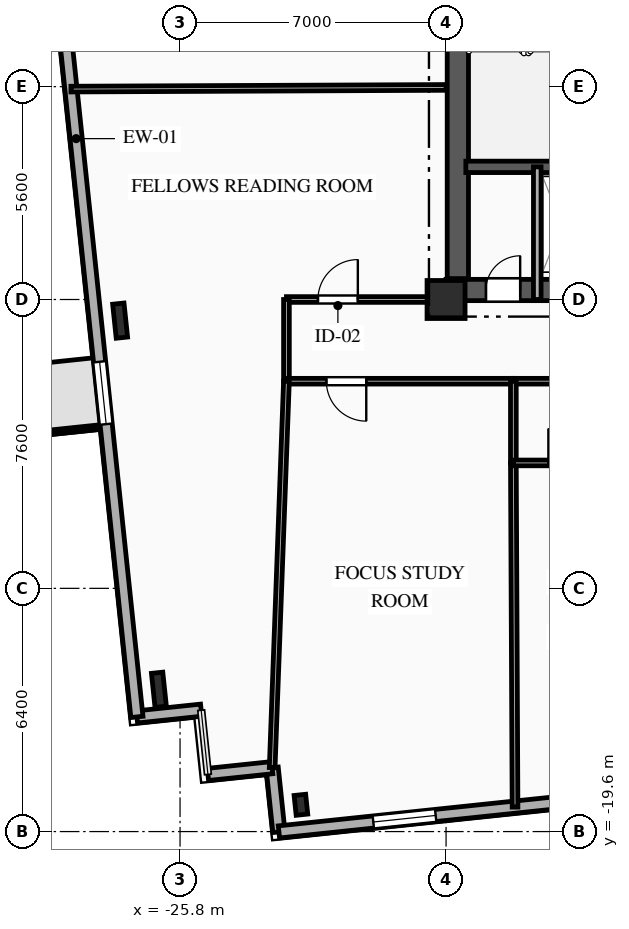
"""IFC4 building model, lengths in metres.
Left out: names, types, materials, properties, quantities, classifications, styles, units other than length and angle.
Written with IfcOpenShell. Run it as: python <this file> out.ifc"""

import sys

from ifc_helpers import new_model, si_unit, direction, frame, frame_2d, origin, origin_2d, place, context, subcontext, project, spatial, rectangle, i_section, extrude, element, fill, save


model = new_model("IFC4")
c1 = context("Model", 3, precision=1e-05, world=origin(), true_north=direction((0.0, 1.0)))
c2 = subcontext(c1, "Body", "Model", "MODEL_VIEW")
j1 = project(units=[si_unit("LENGTHUNIT", "METRE"), si_unit("PLANEANGLEUNIT", "RADIAN")], contexts=[c1])
p1 = place(None, origin())
s1 = spatial("IfcSite", under=j1, at=p1, CompositionType="ELEMENT")
p2 = place(p1, origin())
s2 = spatial("IfcBuilding", under=s1, at=p2, CompositionType="ELEMENT")
p3 = place(p2, frame((0.0, 0.0, 119.2)))
s3 = spatial("IfcBuildingStorey", under=s2, at=p3, CompositionType="ELEMENT", Elevation=119.2)
p4 = place(p3, frame((-18.8, -5.6, 0.0), z_axis=(0.0, 0.0, 1.0), x_axis=(1.0, 0.0, 0.0)))
e1 = element("IfcColumn", 1, at=p4, inside=s3, PredefinedType="COLUMN", context=c2, shape_type="SweptSolid", body=[
    extrude(rectangle(XDim=1.0, YDim=1.0, at=origin_2d()), origin(), (0.0, 0.0, 1.0), 3.35),
])
p5 = place(p3, frame((-22.619, -18.895, 0.0), z_axis=(0.0, 0.0, 1.0), x_axis=(0.994521895368, 0.104528463268, 0.0)))
e2 = element("IfcColumn", 2, at=p5, inside=s3, PredefinedType="COLUMN", context=c2, shape_type="SweptSolid", body=[
    extrude(i_section(OverallWidth=0.306, OverallDepth=0.524, WebThickness=0.021, FlangeThickness=0.04, FilletRadius=0.027, at=origin_2d()), origin(), (0.0, 0.0, 1.0), 3.35),
])
for number, where, z_axis, x_axis in (
    (3, (-27.377, -6.156, 0.0), (0.0, 0.0, 1.0), (0.995, 0.105, 0.0)),
    (4, (-26.356, -15.869, 0.0), (0.0, 0.0, 1.0), (0.995, 0.105, 0.0)),
):
    element("IfcColumn", number, at=place(p3, frame(where, z_axis=z_axis, x_axis=x_axis)), inside=s3, PredefinedType="COLUMN", context=c2, shape_type="SweptSolid", body=[
        extrude(i_section(OverallWidth=0.3, OverallDepth=0.9, WebThickness=0.019, FlangeThickness=0.035, FilletRadius=0.03, at=origin_2d()), origin(), (0.0, 0.0, 1.0), 3.35),
    ])
for number, where, z_axis, x_axis in (
    (5, (-23.198, -19.609, 0.0), (0.0, 0.0, 1.0), (-0.105, 0.995, 0.0)),
    (6, (-23.376, -17.919, 0.0), (0.0, 0.0, 1.0), (-0.995, -0.105, 0.0)),
):
    element("IfcWall", number, at=place(p3, frame(where, z_axis=z_axis, x_axis=x_axis)), inside=s3, PredefinedType="SOLIDWALL", context=c2, shape_type="SweptSolid", body=[
        extrude(rectangle(XDim=1.7, YDim=0.32, at=frame_2d((0.85, 0.0))), origin(), (0.0, 0.0, 1.0), 3.045),
    ])
p6 = place(p3, frame((-25.244, -16.406, 0.0), z_axis=(0.0, 0.0, 1.0), x_axis=(-0.994521177842, -0.104535289845, 0.0)))
e7 = element("IfcWall", 7, at=p6, inside=s3, PredefinedType="SOLIDWALL", context=c2, shape_type="SweptSolid", body=[
    extrude(rectangle(XDim=1.7, YDim=0.32, at=frame_2d((0.85, 0.0))), origin(), (0.0, 0.0, 1.0), 3.045),
])
p7 = place(p3, frame((-26.935, -16.583, 0.0), z_axis=(0.0, 0.0, 1.0), x_axis=(-0.104524887486, 0.994522271192, 0.0)))
e8 = element("IfcWall", 8, at=p7, inside=s3, PredefinedType="SOLIDWALL", context=c2, shape_type="SweptSolid", body=[
    extrude(rectangle(XDim=30.6, YDim=0.32, at=frame_2d((15.3, 0.0))), origin(), (0.0, 0.0, 1.0), 3.045),
])
p8 = place(p7, frame((7.746, 0.0, 0.85)))
e9 = element("IfcOpeningElement", 9, at=p8, cuts=e8, PredefinedType="OPENING", context=c2, shape_type="SweptSolid", body=[
    extrude(rectangle(XDim=1.65, YDim=1.85, at=frame_2d((0.825, 0.925))), frame((0.0, 0.17, 0.0), z_axis=(0.0, -1.0, 0.0), x_axis=(1.0, 0.0, 0.0)), (0.0, 0.0, 1.0), 0.34),
])
p9 = place(p7, frame((22.606, 0.0, 0.85)))
e10 = element("IfcOpeningElement", 10, at=p9, cuts=e8, PredefinedType="OPENING", context=c2, shape_type="SweptSolid", body=[
    extrude(rectangle(XDim=1.65, YDim=1.85, at=frame_2d((0.825, 0.925))), frame((0.0, 0.17, 0.0), z_axis=(0.0, -1.0, 0.0), x_axis=(1.0, 0.0, 0.0)), (0.0, 0.0, 1.0), 0.34),
])
p10 = place(p3, frame((30.307, -13.986, 0.0), z_axis=(0.0, 0.0, 1.0), x_axis=(-0.994521628355, -0.104531003701, 0.0)))
e11 = element("IfcWall", 11, at=p10, inside=s3, PredefinedType="SOLIDWALL", context=c2, shape_type="SweptSolid", body=[
    extrude(rectangle(XDim=53.8, YDim=0.32, at=frame_2d((26.9, 0.0))), origin(), (0.0, 0.0, 1.0), 3.045),
])
p11 = place(p10, frame((3.098, 0.0, 0.85)))
e12 = element("IfcOpeningElement", 12, at=p11, cuts=e11, PredefinedType="OPENING", context=c2, shape_type="SweptSolid", body=[
    extrude(rectangle(XDim=1.65, YDim=1.85, at=frame_2d((0.825, 0.925))), frame((0.0, 0.17, 0.0), z_axis=(0.0, -1.0, 0.0), x_axis=(1.0, 0.0, 0.0)), (0.0, 0.0, 1.0), 0.34),
])
p12 = place(p10, frame((10.143, 0.0, 0.85)))
e13 = element("IfcOpeningElement", 13, at=p12, cuts=e11, PredefinedType="OPENING", context=c2, shape_type="SweptSolid", body=[
    extrude(rectangle(XDim=1.65, YDim=1.85, at=frame_2d((0.825, 0.925))), frame((0.0, 0.17, 0.0), z_axis=(0.0, -1.0, 0.0), x_axis=(1.0, 0.0, 0.0)), (0.0, 0.0, 1.0), 0.34),
])
p13 = place(p10, frame((16.753, 0.0, 0.85)))
e14 = element("IfcOpeningElement", 14, at=p13, cuts=e11, PredefinedType="OPENING", context=c2, shape_type="SweptSolid", body=[
    extrude(rectangle(XDim=2.2, YDim=1.85, at=frame_2d((1.1, 0.925))), frame((0.0, 0.17, 0.0), z_axis=(0.0, -1.0, 0.0), x_axis=(1.0, 0.0, 0.0)), (0.0, 0.0, 1.0), 0.34),
])
p14 = place(p10, frame((23.358, 0.0, 0.85)))
e15 = element("IfcOpeningElement", 15, at=p14, cuts=e11, PredefinedType="OPENING", context=c2, shape_type="SweptSolid", body=[
    extrude(rectangle(XDim=2.2, YDim=1.85, at=frame_2d((1.1, 0.925))), frame((0.0, 0.17, 0.0), z_axis=(0.0, -1.0, 0.0), x_axis=(1.0, 0.0, 0.0)), (0.0, 0.0, 1.0), 0.34),
])
p15 = place(p10, frame((29.963, 0.0, 0.85)))
e16 = element("IfcOpeningElement", 16, at=p15, cuts=e11, PredefinedType="OPENING", context=c2, shape_type="SweptSolid", body=[
    extrude(rectangle(XDim=2.2, YDim=1.85, at=frame_2d((1.1, 0.925))), frame((0.0, 0.17, 0.0), z_axis=(0.0, -1.0, 0.0), x_axis=(1.0, 0.0, 0.0)), (0.0, 0.0, 1.0), 0.34),
])
p16 = place(p10, frame((36.568, 0.0, 0.85)))
e17 = element("IfcOpeningElement", 17, at=p16, cuts=e11, PredefinedType="OPENING", context=c2, shape_type="SweptSolid", body=[
    extrude(rectangle(XDim=2.2, YDim=1.85, at=frame_2d((1.1, 0.925))), frame((0.0, 0.17, 0.0), z_axis=(0.0, -1.0, 0.0), x_axis=(1.0, 0.0, 0.0)), (0.0, 0.0, 1.0), 0.34),
])
p17 = place(p10, frame((43.173, 0.0, 0.85)))
e18 = element("IfcOpeningElement", 18, at=p17, cuts=e11, PredefinedType="OPENING", context=c2, shape_type="SweptSolid", body=[
    extrude(rectangle(XDim=2.2, YDim=1.85, at=frame_2d((1.1, 0.925))), frame((0.0, 0.17, 0.0), z_axis=(0.0, -1.0, 0.0), x_axis=(1.0, 0.0, 0.0)), (0.0, 0.0, 1.0), 0.34),
])
p18 = place(p10, frame((49.653, 0.0, 0.85)))
e19 = element("IfcOpeningElement", 19, at=p18, cuts=e11, PredefinedType="OPENING", context=c2, shape_type="SweptSolid", body=[
    extrude(rectangle(XDim=1.65, YDim=1.85, at=frame_2d((0.825, 0.925))), frame((0.0, 0.17, 0.0), z_axis=(0.0, -1.0, 0.0), x_axis=(1.0, 0.0, 0.0)), (0.0, 0.0, 1.0), 0.34),
])
p19 = place(p3, frame((-18.8, -5.35, 0.0), z_axis=(0.0, 0.0, 1.0), x_axis=(1.0, 0.0, 0.0)))
e20 = element("IfcWall", 20, at=p19, inside=s3, PredefinedType="SHEAR", context=c2, shape_type="SweptSolid", body=[
    extrude(rectangle(XDim=9.6, YDim=0.56, at=frame_2d((4.8, 0.0))), origin(), (0.0, 0.0, 1.0), 3.045),
])
p20 = place(p19, frame((1.05, 0.0, 0.0)))
e21 = element("IfcOpeningElement", 21, at=p20, cuts=e20, PredefinedType="OPENING", context=c2, shape_type="SweptSolid", body=[
    extrude(rectangle(XDim=0.9, YDim=2.1, at=frame_2d((0.45, 1.05))), frame((0.0, 0.29, 0.0), z_axis=(0.0, -1.0, 0.0), x_axis=(1.0, 0.0, 0.0)), (0.0, 0.0, 1.0), 0.58),
])
p21 = place(p3, frame((-18.49, -5.05, 0.0), z_axis=(0.0, 0.0, 1.0), x_axis=(0.0, 1.0, 0.0)))
e22 = element("IfcWall", 22, at=p21, inside=s3, PredefinedType="SHEAR", context=c2, shape_type="SweptSolid", body=[
    extrude(rectangle(XDim=10.1, YDim=0.56, at=frame_2d((5.05, 0.0))), origin(), (0.0, 0.0, 1.0), 3.045),
])
p22 = place(p3, frame((-18.28, -2.11, 0.0), z_axis=(0.0, 0.0, 1.0), x_axis=(1.0, 0.0, 0.0)))
e23 = element("IfcWall", 23, at=p22, inside=s3, PredefinedType="SHEAR", context=c2, shape_type="SweptSolid", body=[
    extrude(rectangle(XDim=3.18, YDim=0.3, at=frame_2d((1.59, 0.0))), origin(), (0.0, 0.0, 1.0), 3.045),
])
p23 = place(p3, frame((-16.4, -5.6, 0.0), z_axis=(0.0, 0.0, 1.0), x_axis=(0.0, 1.0, 0.0)))
e24 = element("IfcWall", 24, at=p23, inside=s3, PredefinedType="PARTITIONING", context=c2, shape_type="SweptSolid", body=[
    extrude(rectangle(XDim=3.49, YDim=0.2, at=frame_2d((1.745, 0.0))), origin(), (0.0, 0.0, 1.0), 3.045),
])
p24 = place(p3, frame((-23.0, -5.6, 0.0), z_axis=(0.0, 0.0, 1.0), x_axis=(1.0, 0.0, 0.0)))
e25 = element("IfcWall", 25, at=p24, inside=s3, PredefinedType="PARTITIONING", context=c2, shape_type="SweptSolid", body=[
    extrude(rectangle(XDim=4.2, YDim=0.15, at=frame_2d((2.1, 0.0))), origin(), (0.0, 0.0, 1.0), 3.045),
])
p25 = place(p24, frame((0.829, 0.0, 0.0)))
e26 = element("IfcOpeningElement", 26, at=p25, cuts=e25, PredefinedType="OPENING", context=c2, shape_type="SweptSolid", body=[
    extrude(rectangle(XDim=1.05, YDim=2.15, at=frame_2d((0.525, 1.075))), frame((0.0, 0.085, 0.0), z_axis=(0.0, -1.0, 0.0), x_axis=(1.0, 0.0, 0.0)), (0.0, 0.0, 1.0), 0.17),
])
p26 = place(p3, frame((-23.0, -7.75, 0.0), z_axis=(0.0, 0.0, 1.0), x_axis=(0.0, 1.0, 0.0)))
e27 = element("IfcWall", 27, at=p26, inside=s3, PredefinedType="PARTITIONING", context=c2, shape_type="SweptSolid", body=[
    extrude(rectangle(XDim=2.15, YDim=0.15, at=frame_2d((1.075, 0.0))), origin(), (0.0, 0.0, 1.0), 2.7),
])
p27 = place(p3, frame((-17.029, -7.75, 0.0), z_axis=(0.0, 0.0, 1.0), x_axis=(-1.0, 0.0, 0.0)))
e28 = element("IfcWall", 28, at=p27, inside=s3, PredefinedType="PARTITIONING", context=c2, shape_type="SweptSolid", body=[
    extrude(rectangle(XDim=5.971, YDim=0.15, at=frame_2d((2.985, 0.0))), origin(), (0.0, 0.0, 1.0), 3.045),
])
p28 = place(p27, frame((3.871, 0.0, 0.0)))
e29 = element("IfcOpeningElement", 29, at=p28, cuts=e28, PredefinedType="OPENING", context=c2, shape_type="SweptSolid", body=[
    extrude(rectangle(XDim=1.05, YDim=2.15, at=frame_2d((0.525, 1.075))), frame((0.0, 0.085, 0.0), z_axis=(0.0, -1.0, 0.0), x_axis=(1.0, 0.0, 0.0)), (0.0, 0.0, 1.0), 0.17),
])
p29 = place(p3, frame((-14.579, -7.75, 0.0), z_axis=(0.0, 0.0, 1.0), x_axis=(-1.0, 0.0, 0.0)))
e30 = element("IfcWall", 30, at=p29, inside=s3, PredefinedType="PLUMBINGWALL", context=c2, shape_type="SweptSolid", body=[
    extrude(rectangle(XDim=2.45, YDim=0.15, at=frame_2d((1.225, 0.0))), origin(), (0.0, 0.0, 1.0), 3.045),
])
p30 = place(p3, frame((-28.671, -0.064, 0.0), z_axis=(0.0, 0.0, 1.0), x_axis=(0.999990089865, 0.004451985263, 0.0)))
e31 = element("IfcWall", 31, at=p30, inside=s3, PredefinedType="PARTITIONING", context=c2, shape_type="SweptSolid", body=[
    extrude(rectangle(XDim=9.871, YDim=0.15, at=frame_2d((4.936, 0.0))), origin(), (0.0, 0.0, 1.0), 3.045),
])
p31 = place(p3, frame((-23.0, -7.75, 0.0), z_axis=(0.0, 0.0, 1.0), x_axis=(-0.036924695214, -0.999318050914, 0.0)))
e32 = element("IfcWall", 32, at=p31, inside=s3, PredefinedType="PARTITIONING", context=c2, shape_type="SweptSolid", body=[
    extrude(rectangle(XDim=10.176, YDim=0.15, at=frame_2d((5.088, 0.0))), origin(), (0.0, 0.0, 1.0), 3.045),
])
p32 = place(p3, frame((-17.029, -9.9, 0.0), z_axis=(0.0, 0.0, 1.0), x_axis=(0.004852348859, -0.999988227286, 0.0)))
e33 = element("IfcWall", 33, at=p32, inside=s3, PredefinedType="PARTITIONING", context=c2, shape_type="SweptSolid", body=[
    extrude(rectangle(XDim=9.056, YDim=0.15, at=frame_2d((4.528, 0.0))), origin(), (0.0, 0.0, 1.0), 3.045),
])
p33 = place(p3, frame((-17.029, -7.75, 0.0), z_axis=(0.0, 0.0, 1.0), x_axis=(0.0, -1.0, 0.0)))
e34 = element("IfcWall", 34, at=p33, inside=s3, PredefinedType="PLUMBINGWALL", context=c2, shape_type="SweptSolid", body=[
    extrude(rectangle(XDim=2.15, YDim=0.15, at=frame_2d((1.075, 0.0))), origin(), (0.0, 0.0, 1.0), 3.045),
])
p34 = place(p3, frame((-17.029, -9.9, 0.0), z_axis=(0.0, 0.0, 1.0), x_axis=(1.0, 0.0, 0.0)))
e35 = element("IfcWall", 35, at=p34, inside=s3, PredefinedType="PLUMBINGWALL", context=c2, shape_type="SweptSolid", body=[
    extrude(rectangle(XDim=2.45, YDim=0.15, at=frame_2d((1.225, 0.0))), origin(), (0.0, 0.0, 1.0), 3.045),
])
p35 = place(p34, frame((0.921, 0.0, 0.0)))
e36 = element("IfcOpeningElement", 36, at=p35, cuts=e35, PredefinedType="OPENING", context=c2, shape_type="SweptSolid", body=[
    extrude(rectangle(XDim=0.9, YDim=2.1, at=frame_2d((0.45, 1.05))), frame((0.0, 0.085, 0.0), z_axis=(0.0, -1.0, 0.0), x_axis=(1.0, 0.0, 0.0)), (0.0, 0.0, 1.0), 0.17),
])
p36 = place(p8, origin())
e37 = element("IfcWindow", 37, at=p36, inside=s3, PartitioningType="SINGLE_PANEL", PredefinedType="WINDOW", context=c2, shape_type="SweptSolid", body=[
    extrude(rectangle(XDim=1.65, YDim=1.85, at=frame_2d((0.825, 0.925))), frame((0.0, 0.03, 0.0), z_axis=(0.0, -1.0, 0.0), x_axis=(1.0, 0.0, 0.0)), (0.0, 0.0, 1.0), 0.06),
])
fill(e9, e37)
p37 = place(p18, origin())
e38 = element("IfcWindow", 38, at=p37, inside=s3, PartitioningType="SINGLE_PANEL", PredefinedType="WINDOW", context=c2, shape_type="SweptSolid", body=[
    extrude(rectangle(XDim=1.65, YDim=1.85, at=frame_2d((0.825, 0.925))), frame((0.0, 0.03, 0.0), z_axis=(0.0, -1.0, 0.0), x_axis=(1.0, 0.0, 0.0)), (0.0, 0.0, 1.0), 0.06),
])
fill(e19, e38)
p38 = place(p20, origin())
e39 = element("IfcDoor", 39, at=p38, inside=s3, OperationType="SINGLE_SWING_RIGHT", PredefinedType="DOOR", context=c2, shape_type="SweptSolid", body=[
    extrude(rectangle(XDim=0.9, YDim=2.1, at=frame_2d((0.45, 1.05))), frame((0.0, 0.025, 0.0), z_axis=(0.0, -1.0, 0.0), x_axis=(1.0, 0.0, 0.0)), (0.0, 0.0, 1.0), 0.05),
])
fill(e21, e39)
p39 = place(p25, origin())
e40 = element("IfcDoor", 40, at=p39, inside=s3, OperationType="SINGLE_SWING_RIGHT", PredefinedType="DOOR", context=c2, shape_type="SweptSolid", body=[
    extrude(rectangle(XDim=1.05, YDim=2.15, at=frame_2d((0.525, 1.075))), frame((0.0, 0.025, 0.0), z_axis=(0.0, -1.0, 0.0), x_axis=(1.0, 0.0, 0.0)), (0.0, 0.0, 1.0), 0.05),
])
fill(e26, e40)
p40 = place(p28, origin())
e41 = element("IfcDoor", 41, at=p40, inside=s3, OperationType="SINGLE_SWING_LEFT", PredefinedType="DOOR", context=c2, shape_type="SweptSolid", body=[
    extrude(rectangle(XDim=1.05, YDim=2.15, at=frame_2d((0.525, 1.075))), frame((0.0, 0.025, 0.0), z_axis=(0.0, -1.0, 0.0), x_axis=(1.0, 0.0, 0.0)), (0.0, 0.0, 1.0), 0.05),
])
fill(e29, e41)
p41 = place(p35, origin())
e42 = element("IfcDoor", 42, at=p41, inside=s3, OperationType="SINGLE_SWING_LEFT", PredefinedType="DOOR", context=c2, shape_type="SweptSolid", body=[
    extrude(rectangle(XDim=0.9, YDim=2.1, at=frame_2d((0.45, 1.05))), frame((0.0, 0.025, 0.0), z_axis=(0.0, -1.0, 0.0), x_axis=(1.0, 0.0, 0.0)), (0.0, 0.0, 1.0), 0.05),
])
fill(e36, e42)
save(model, sys.argv[1])
